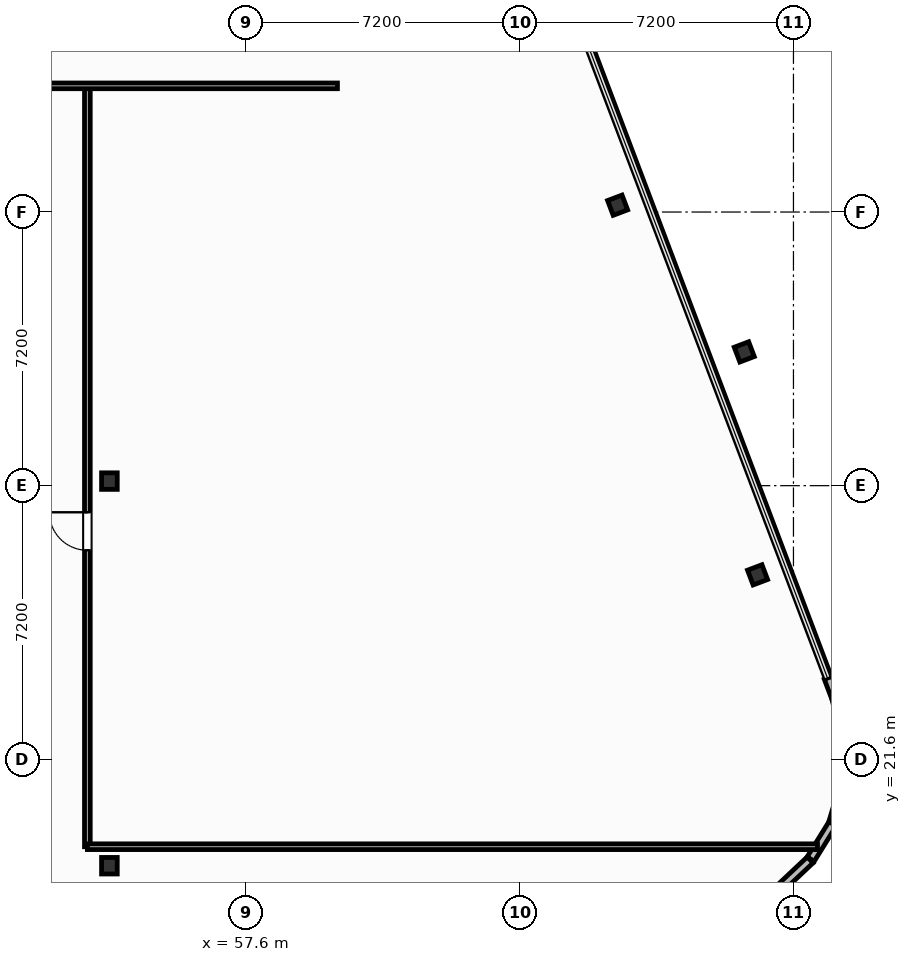
"""IFC4 building model, lengths in metres.
Left out: names, types, materials, properties, quantities, classifications, styles, units other than length and angle.
Written with IfcOpenShell. Run it as: python <this file> out.ifc"""

import sys

from ifc_helpers import new_model, si_unit, direction, frame, frame_2d, origin, origin_2d, place, context, subcontext, project, spatial, rectangle, i_section, extrude, element, fill, save


model = new_model("IFC4")
c1 = context("Model", 3, precision=1e-05, world=origin(), true_north=direction((0.0, 1.0)))
c2 = subcontext(c1, "Body", "Model", "MODEL_VIEW")
j1 = project(units=[si_unit("LENGTHUNIT", "METRE"), si_unit("PLANEANGLEUNIT", "RADIAN")], contexts=[c1])
p1 = place(None, origin())
s1 = spatial("IfcSite", under=j1, at=p1, CompositionType="ELEMENT")
p2 = place(p1, origin())
s2 = spatial("IfcBuilding", under=s1, at=p2, CompositionType="ELEMENT")
p3 = place(p2, frame((0.0, 0.0, 207.9)))
s3 = spatial("IfcBuildingStorey", under=s2, at=p3, CompositionType="ELEMENT", Elevation=207.9)
for number, where, z_axis, x_axis in (
    (1, (54.0, 18.8, 0.0), (0.0, 0.0, 1.0), (1.0, 0.0, 0.0)),
    (2, (54.0, 28.92, 0.0), (0.0, 0.0, 1.0), (1.0, 0.0, 0.0)),
):
    element("IfcColumn", number, at=place(p3, frame(where, z_axis=z_axis, x_axis=x_axis)), inside=s3, PredefinedType="COLUMN", context=c2, shape_type="SweptSolid", body=[
        extrude(i_section(OverallWidth=0.412, OverallDepth=0.435, WebThickness=0.036, FlangeThickness=0.057, FilletRadius=0.025, at=origin_2d()), origin(), (0.0, 0.0, 1.0), 4.8),
    ])
for number, where, z_axis, x_axis in (
    (3, (71.055, 26.453, -0.32), (0.0, 0.0, 1.0), (0.935, 0.354, 0.0)),
    (4, (70.706, 32.32, -0.32), (0.0, 0.0, 1.0), (0.935, 0.354, 0.0)),
    (5, (67.373, 36.18, -0.32), (0.0, 0.0, 1.0), (0.935, 0.354, 0.0)),
):
    element("IfcColumn", number, at=place(p3, frame(where, z_axis=z_axis, x_axis=x_axis)), inside=s3, PredefinedType="COLUMN", context=c2, shape_type="SweptSolid", body=[
        extrude(i_section(OverallWidth=0.406, OverallDepth=0.416, WebThickness=0.03, FlangeThickness=0.048, FilletRadius=0.025, at=origin_2d()), origin(), (0.0, 0.0, 1.0), 5.12),
    ])
p4 = place(p3, frame((8.315, 33.164, 0.0), z_axis=(0.0, 0.0, 1.0), x_axis=(0.935222646765, 0.354060165759, 0.0)))
e6 = element("IfcWall", 6, at=p4, inside=s3, PredefinedType="SOLIDWALL", context=c2, shape_type="SweptSolid", body=[
    extrude(rectangle(XDim=52.2, YDim=0.22, at=frame_2d((26.1, 0.0))), origin(), (0.0, 0.0, 1.0), 3.83),
])
p5 = place(p4, frame((23.64, 0.0, 0.0)))
e7 = element("IfcOpeningElement", 7, at=p5, cuts=e6, PredefinedType="OPENING", context=c2, shape_type="SweptSolid", body=[
    extrude(rectangle(XDim=1.85, YDim=2.3, at=frame_2d((0.925, 1.15))), frame((0.0, 0.12, 0.0), z_axis=(0.0, -1.0, 0.0), x_axis=(1.0, 0.0, 0.0)), (0.0, 0.0, 1.0), 0.24),
])
p6 = place(p4, frame((0.55, 0.0, 0.75)))
e8 = element("IfcOpeningElement", 8, at=p6, cuts=e6, PredefinedType="OPENING", context=c2, shape_type="SweptSolid", body=[
    extrude(rectangle(XDim=1.85, YDim=1.75, at=frame_2d((0.925, 0.875))), frame((0.0, 0.12, 0.0), z_axis=(0.0, -1.0, 0.0), x_axis=(1.0, 0.0, 0.0)), (0.0, 0.0, 1.0), 0.24),
])
p7 = place(p4, frame((49.8, 0.0, 0.75)))
e9 = element("IfcOpeningElement", 9, at=p7, cuts=e6, PredefinedType="OPENING", context=c2, shape_type="SweptSolid", body=[
    extrude(rectangle(XDim=1.85, YDim=1.75, at=frame_2d((0.925, 0.875))), frame((0.0, 0.12, 0.0), z_axis=(0.0, -1.0, 0.0), x_axis=(1.0, 0.0, 0.0)), (0.0, 0.0, 1.0), 0.24),
])
for number, where, z_axis, x_axis in (
    (10, (71.645, 18.204, 0.0), (0.0, 0.0, 1.0), (0.729, 0.685, 0.0)),
    (11, (72.453, 18.973, 0.0), (0.0, 0.0, 1.0), (0.526, 0.85, 0.0)),
    (12, (73.035, 19.926, 0.0), (0.0, 0.0, 1.0), (0.288, 0.958, 0.0)),
):
    element("IfcWall", number, at=place(p3, frame(where, z_axis=z_axis, x_axis=x_axis)), inside=s3, PredefinedType="SOLIDWALL", context=c2, shape_type="SweptSolid", body=[
        extrude(rectangle(XDim=1.092, YDim=0.22, at=frame_2d((0.546, 0.0))), origin(), (0.0, 0.0, 1.0), 3.83),
    ])
p8 = place(p3, frame((73.118, 23.206, 0.0), z_axis=(0.0, 0.0, 1.0), x_axis=(-0.353902093829, 0.935282474969, 0.0)))
e13 = element("IfcWall", 13, at=p8, inside=s3, PredefinedType="SOLIDWALL", context=c2, shape_type="SweptSolid", body=[
    extrude(rectangle(XDim=0.577, YDim=0.22, at=frame_2d((0.289, 0.0))), origin(), (0.0, 0.0, 1.0), 3.83),
])
p9 = place(p3, frame((53.42, 19.3, 0.0), z_axis=(0.0, 0.0, 1.0), x_axis=(0.0, 1.0, 0.0)))
e14 = element("IfcWall", 14, at=p9, inside=s3, PredefinedType="PARTITIONING", context=c2, shape_type="SweptSolid", body=[
    extrude(rectangle(XDim=20.02, YDim=0.15, at=frame_2d((10.01, 0.0))), origin(), (0.0, 0.0, 1.0), 4.55),
])
p10 = place(p9, frame((7.8, 0.0, 0.0)))
e15 = element("IfcOpeningElement", 15, at=p10, cuts=e14, PredefinedType="OPENING", context=c2, shape_type="SweptSolid", body=[
    extrude(rectangle(XDim=1.0, YDim=2.05, at=frame_2d((0.5, 1.025))), frame((0.0, 0.085, 0.0), z_axis=(0.0, -1.0, 0.0), x_axis=(1.0, 0.0, 0.0)), (0.0, 0.0, 1.0), 0.17),
])
p11 = place(p3, frame((53.42, 19.3, 0.0), z_axis=(0.0, 0.0, 1.0), x_axis=(1.0, 0.0, 0.0)))
e16 = element("IfcWall", 16, at=p11, inside=s3, PredefinedType="PARTITIONING", context=c2, shape_type="SweptSolid", body=[
    extrude(rectangle(XDim=19.212, YDim=0.15, at=frame_2d((9.606, 0.0))), origin(), (0.0, 0.0, 1.0), 4.55),
])
p12 = place(p3, frame((20.0, 39.32, 0.0), z_axis=(0.0, 0.0, 1.0), x_axis=(1.0, 0.0, 0.0)))
e17 = element("IfcWall", 17, at=p12, inside=s3, PredefinedType="PARTITIONING", context=c2, shape_type="SweptSolid", body=[
    extrude(rectangle(XDim=40.0, YDim=0.15, at=frame_2d((20.0, 0.0))), origin(), (0.0, 0.0, 1.0), 4.55),
])
p13 = place(p12, frame((31.2, 0.0, 0.0)))
e18 = element("IfcOpeningElement", 18, at=p13, cuts=e17, PredefinedType="OPENING", context=c2, shape_type="SweptSolid", body=[
    extrude(rectangle(XDim=1.0, YDim=2.05, at=frame_2d((0.5, 1.025))), frame((0.0, 0.085, 0.0), z_axis=(0.0, -1.0, 0.0), x_axis=(1.0, 0.0, 0.0)), (0.0, 0.0, 1.0), 0.17),
])
p14 = place(p10, origin())
e19 = element("IfcDoor", 19, at=p14, inside=s3, OperationType="SINGLE_SWING_RIGHT", PredefinedType="DOOR", context=c2, shape_type="SweptSolid", body=[
    extrude(rectangle(XDim=1.0, YDim=2.05, at=frame_2d((0.5, 1.025))), frame((0.0, 0.025, 0.0), z_axis=(0.0, -1.0, 0.0), x_axis=(1.0, 0.0, 0.0)), (0.0, 0.0, 1.0), 0.05),
])
fill(e15, e19)
save(model, sys.argv[1])
